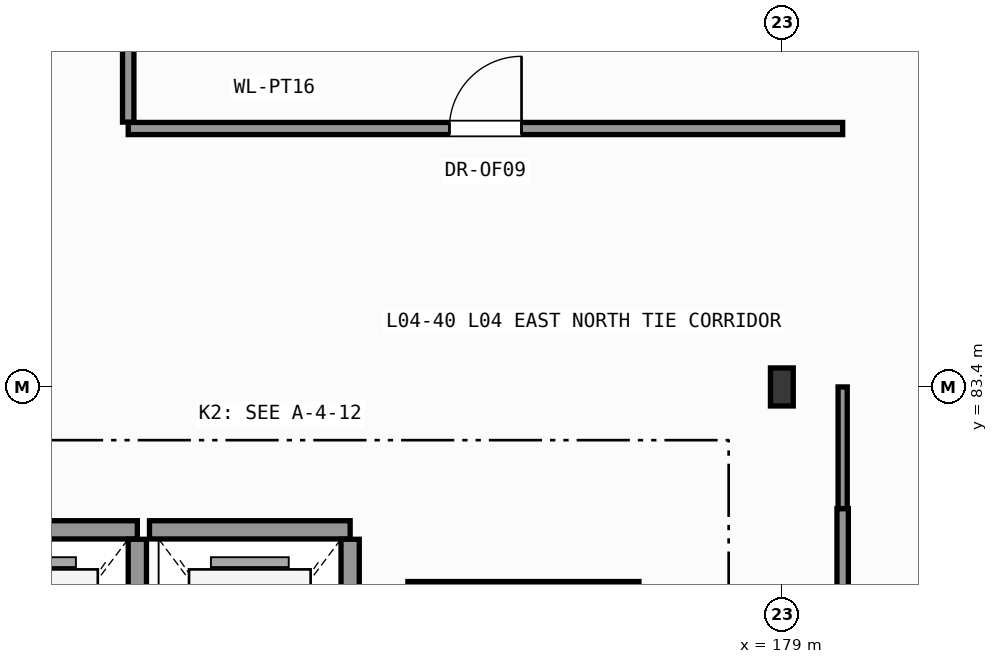
"""IFC4 building model, lengths in metres.
Left out: names, types, materials, properties, quantities, classifications, styles, units other than length and angle.
Written with IfcOpenShell. Run it as: python <this file> out.ifc"""

import sys

from ifc_helpers import new_model, si_unit, direction, frame, frame_2d, origin, origin_2d, place, context, subcontext, project, spatial, rectangle, i_section, extrude, element, fill, save


model = new_model("IFC4")
c1 = context("Model", 3, precision=1e-05, world=origin(), true_north=direction((0.0, 1.0)))
c2 = subcontext(c1, "Body", "Model", "MODEL_VIEW")
j1 = project(units=[si_unit("LENGTHUNIT", "METRE"), si_unit("PLANEANGLEUNIT", "RADIAN")], contexts=[c1])
p1 = place(None, origin())
s1 = spatial("IfcSite", under=j1, at=p1, CompositionType="ELEMENT")
p2 = place(p1, origin())
s2 = spatial("IfcBuilding", under=s1, at=p2, CompositionType="ELEMENT")
p3 = place(p2, frame((0.0, 0.0, 18.0)))
s3 = spatial("IfcBuildingStorey", under=s2, at=p3, CompositionType="ELEMENT", Elevation=18.0)
p4 = place(p3, frame((179.0, 83.4, 0.0), z_axis=(0.0, 0.0, 1.0), x_axis=(1.0, 0.0, 0.0)))
e1 = element("IfcColumn", 1, at=p4, inside=s3, PredefinedType="COLUMN", context=c2, shape_type="SweptSolid", body=[
    extrude(i_section(OverallWidth=0.3, OverallDepth=0.5, WebThickness=0.014, FlangeThickness=0.028, FilletRadius=0.027, at=origin_2d()), origin(), (0.0, 0.0, 1.0), 4.2),
])
p5 = place(p3, frame((167.88, 81.52, 0.0), z_axis=(0.0, 0.0, 1.0), x_axis=(1.0, 0.0, 0.0)))
e2 = element("IfcWall", 2, at=p5, inside=s3, PredefinedType="SHEAR", context=c2, shape_type="SweptSolid", body=[
    extrude(rectangle(XDim=2.64, YDim=0.24, at=frame_2d((1.32, 0.0))), origin(), (0.0, 0.0, 1.0), 3.98),
])
p6 = place(p3, frame((170.52, 78.204, 0.0), z_axis=(0.0, 0.0, 1.0), x_axis=(0.0, 1.0, 0.0)))
e3 = element("IfcWall", 3, at=p6, inside=s3, PredefinedType="SHEAR", context=c2, shape_type="SweptSolid", body=[
    extrude(rectangle(XDim=3.192, YDim=0.24, at=frame_2d((1.596, 0.0))), origin(), (0.0, 0.0, 1.0), 3.98),
])
p7 = place(p3, frame((170.68, 81.52, 0.0), z_axis=(0.0, 0.0, 1.0), x_axis=(1.0, 0.0, 0.0)))
e4 = element("IfcWall", 4, at=p7, inside=s3, PredefinedType="SHEAR", context=c2, shape_type="SweptSolid", body=[
    extrude(rectangle(XDim=2.64, YDim=0.24, at=frame_2d((1.32, 0.0))), origin(), (0.0, 0.0, 1.0), 3.98),
])
p8 = place(p3, frame((173.32, 78.204, 0.0), z_axis=(0.0, 0.0, 1.0), x_axis=(0.0, 1.0, 0.0)))
e5 = element("IfcWall", 5, at=p8, inside=s3, PredefinedType="SHEAR", context=c2, shape_type="SweptSolid", body=[
    extrude(rectangle(XDim=3.192, YDim=0.24, at=frame_2d((1.596, 0.0))), origin(), (0.0, 0.0, 1.0), 3.98),
])
p9 = place(p3, frame((174.08, 80.72, 0.0), z_axis=(0.0, 0.0, 1.0), x_axis=(1.0, 0.0, 0.0)))
e6 = element("IfcWall", 6, at=p9, inside=s3, PredefinedType="SHEAR", context=c2, shape_type="SweptSolid", body=[
    extrude(rectangle(XDim=3.04, YDim=0.24, at=frame_2d((1.52, 0.0))), origin(), (0.0, 0.0, 1.0), 3.98),
])
p10 = place(p3, frame((179.8, 73.5, 0.0), z_axis=(0.0, 0.0, 1.0), x_axis=(0.0, 1.0, 0.0)))
e7 = element("IfcWall", 7, at=p10, inside=s3, PredefinedType="PARTITIONING", context=c2, shape_type="SweptSolid", body=[
    extrude(rectangle(XDim=8.3, YDim=0.15, at=frame_2d((4.15, 0.0))), origin(), (0.0, 0.0, 1.0), 3.98),
])
p11 = place(p10, frame((4.31, 0.0, 0.0)))
e8 = element("IfcOpeningElement", 8, at=p11, cuts=e7, PredefinedType="OPENING", context=c2, shape_type="SweptSolid", body=[
    extrude(rectangle(XDim=2.2, YDim=2.6, at=frame_2d((1.1, 1.3))), frame((0.0, 0.085, 0.0), z_axis=(0.0, -1.0, 0.0), x_axis=(1.0, 0.0, 0.0)), (0.0, 0.0, 1.0), 0.17),
])
p12 = place(p3, frame((179.8, 81.8, 0.0), z_axis=(0.0, 0.0, 1.0), x_axis=(0.0, 1.0, 0.0)))
e9 = element("IfcWall", 9, at=p12, inside=s3, PredefinedType="PARTITIONING", context=c2, shape_type="SweptSolid", body=[
    extrude(rectangle(XDim=1.6, YDim=0.12, at=frame_2d((0.8, 0.0))), origin(), (0.0, 0.0, 1.0), 3.98),
])
p13 = place(p3, frame((170.4, 86.8, 0.0), z_axis=(0.0, 0.0, 1.0), x_axis=(1.0, 0.0, 0.0)))
e10 = element("IfcWall", 10, at=p13, inside=s3, PredefinedType="PARTITIONING", context=c2, shape_type="SweptSolid", body=[
    extrude(rectangle(XDim=9.4, YDim=0.16, at=frame_2d((4.7, 0.0))), origin(), (0.0, 0.0, 1.0), 3.635),
])
p14 = place(p13, frame((4.225, 0.0, 0.0)))
e11 = element("IfcOpeningElement", 11, at=p14, cuts=e10, PredefinedType="OPENING", context=c2, shape_type="SweptSolid", body=[
    extrude(rectangle(XDim=0.95, YDim=2.1, at=frame_2d((0.475, 1.05))), frame((0.0, 0.09, 0.0), z_axis=(0.0, -1.0, 0.0), x_axis=(1.0, 0.0, 0.0)), (0.0, 0.0, 1.0), 0.18),
])
p15 = place(p3, frame((170.4, 86.884, 0.0), z_axis=(0.0, 0.0, 1.0), x_axis=(0.0, 1.0, 0.0)))
e12 = element("IfcWall", 12, at=p15, inside=s3, PredefinedType="PARTITIONING", context=c2, shape_type="SweptSolid", body=[
    extrude(rectangle(XDim=11.116, YDim=0.15, at=frame_2d((5.558, 0.0))), origin(), (0.0, 0.0, 1.0), 3.98),
])
p16 = place(p15, frame((5.033, 0.0, 0.0)))
e13 = element("IfcOpeningElement", 13, at=p16, cuts=e12, PredefinedType="OPENING", context=c2, shape_type="SweptSolid", body=[
    extrude(rectangle(XDim=1.05, YDim=2.2, at=frame_2d((0.525, 1.1))), frame((0.0, 0.085, 0.0), z_axis=(0.0, -1.0, 0.0), x_axis=(1.0, 0.0, 0.0)), (0.0, 0.0, 1.0), 0.17),
])
p17 = place(p14, origin())
e14 = element("IfcDoor", 14, at=p17, inside=s3, OperationType="SINGLE_SWING_RIGHT", PredefinedType="DOOR", context=c2, shape_type="SweptSolid", body=[
    extrude(rectangle(XDim=0.95, YDim=2.1, at=frame_2d((0.475, 1.05))), frame((0.0, 0.025, 0.0), z_axis=(0.0, -1.0, 0.0), x_axis=(1.0, 0.0, 0.0)), (0.0, 0.0, 1.0), 0.05),
])
fill(e11, e14)
save(model, sys.argv[1])
